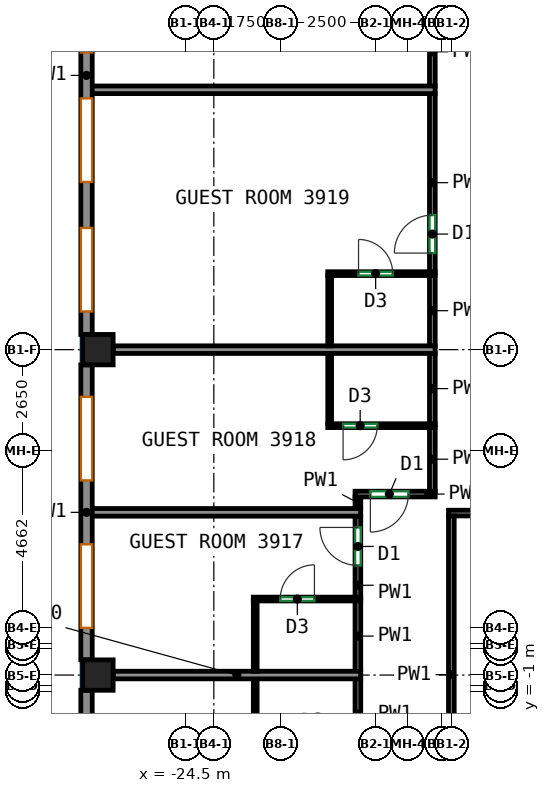
"""IFC4 building model, lengths in metres.
Left out: names, types, materials, properties, quantities, classifications, styles, units other than length and angle.
Written with IfcOpenShell. Run it as: python <this file> out.ifc"""

import sys

from ifc_helpers import new_model, si_unit, direction, frame, frame_2d, origin, origin_2d, place, context, subcontext, project, spatial, rectangle, extrude, source, transform, mapped, element, fill, save


model = new_model("IFC4")
c1 = context("Model", 3, precision=1e-05, world=origin(), true_north=direction((0.0, 1.0)))
c2 = subcontext(c1, "Body", "Model", "MODEL_VIEW")
j1 = project(units=[si_unit("LENGTHUNIT", "METRE"), si_unit("PLANEANGLEUNIT", "RADIAN")], contexts=[c1])
p1 = place(None, origin())
s1 = spatial("IfcSite", under=j1, at=p1, CompositionType="ELEMENT")
p2 = place(p1, origin())
s2 = spatial("IfcBuilding", under=s1, at=p2, CompositionType="ELEMENT")
p3 = place(p2, frame((0.0, 0.0, 168.5)))
s3 = spatial("IfcBuildingStorey", under=s2, at=p3, CompositionType="ELEMENT", Elevation=168.5)
m1 = source(origin(), c2, "Body", "SweptSolid", [
    extrude(rectangle(XDim=0.8, YDim=0.8, at=origin_2d()), origin(), (0.0, 0.0, 1.0), 3.12),
])
for number, where, z_axis, x_axis in (
    (1, (-26.8, -0.562, 0.0), (0.0, 0.0, 1.0), (1.0, 0.0, 0.0)),
    (2, (-26.8, 8.0, 0.0), (0.0, 0.0, 1.0), (1.0, 0.0, 0.0)),
):
    element("IfcColumn", number, at=place(p3, frame(where, z_axis=z_axis, x_axis=x_axis)), inside=s3, PredefinedType="COLUMN", context=c2, shape_type="MappedRepresentation", body=[
        mapped(m1, transform((0.0, 0.0, 0.0))),
    ])
m2 = source(origin(), c2, "Body", "SweptSolid", [
    extrude(rectangle(XDim=13.632, YDim=0.3, at=frame_2d((6.816, 0.0))), origin(), (0.0, 0.0, 1.0), 3.12),
])
p4 = place(p3, frame((-27.1, 22.032, 0.0), z_axis=(0.0, 0.0, 1.0), x_axis=(0.0, -1.0, 0.0)))
e3 = element("IfcWall", 3, at=p4, inside=s3, PredefinedType="SOLIDWALL", context=c2, shape_type="MappedRepresentation", body=[
    mapped(m2, transform((0.0, 0.0, 0.0))),
])
p5 = place(p4, frame((0.604, 0.0, 0.85)))
e4 = element("IfcOpeningElement", 4, at=p5, cuts=e3, PredefinedType="OPENING", context=c2, shape_type="SweptSolid", body=[
    extrude(rectangle(XDim=2.2, YDim=1.95, at=frame_2d((1.1, 0.975))), frame((0.0, 0.16, 0.0), z_axis=(0.0, -1.0, 0.0), x_axis=(1.0, 0.0, 0.0)), (0.0, 0.0, 1.0), 0.32),
])
p6 = place(p4, frame((4.012, 0.0, 0.85)))
e5 = element("IfcOpeningElement", 5, at=p6, cuts=e3, PredefinedType="OPENING", context=c2, shape_type="SweptSolid", body=[
    extrude(rectangle(XDim=2.2, YDim=1.95, at=frame_2d((1.1, 0.975))), frame((0.0, 0.16, 0.0), z_axis=(0.0, -1.0, 0.0), x_axis=(1.0, 0.0, 0.0)), (0.0, 0.0, 1.0), 0.32),
])
p7 = place(p4, frame((7.42, 0.0, 0.85)))
e6 = element("IfcOpeningElement", 6, at=p7, cuts=e3, PredefinedType="OPENING", context=c2, shape_type="SweptSolid", body=[
    extrude(rectangle(XDim=2.2, YDim=1.95, at=frame_2d((1.1, 0.975))), frame((0.0, 0.16, 0.0), z_axis=(0.0, -1.0, 0.0), x_axis=(1.0, 0.0, 0.0)), (0.0, 0.0, 1.0), 0.32),
])
p8 = place(p4, frame((10.828, 0.0, 0.85)))
e7 = element("IfcOpeningElement", 7, at=p8, cuts=e3, PredefinedType="OPENING", context=c2, shape_type="SweptSolid", body=[
    extrude(rectangle(XDim=2.2, YDim=1.95, at=frame_2d((1.1, 0.975))), frame((0.0, 0.16, 0.0), z_axis=(0.0, -1.0, 0.0), x_axis=(1.0, 0.0, 0.0)), (0.0, 0.0, 1.0), 0.32),
])
m3 = source(origin(), c2, "Body", "SweptSolid", [
    extrude(rectangle(XDim=7.763, YDim=0.3, at=frame_2d((3.881, 0.0))), origin(), (0.0, 0.0, 1.0), 3.12),
])
p9 = place(p3, frame((-27.1, 7.6, 0.0), z_axis=(0.0, 0.0, 1.0), x_axis=(0.0, -1.0, 0.0)))
e8 = element("IfcWall", 8, at=p9, inside=s3, PredefinedType="SOLIDWALL", context=c2, shape_type="MappedRepresentation", body=[
    mapped(m3, transform((0.0, 0.0, 0.0))),
])
p10 = place(p9, frame((0.841, 0.0, 0.85)))
e9 = element("IfcOpeningElement", 9, at=p10, cuts=e8, PredefinedType="OPENING", context=c2, shape_type="SweptSolid", body=[
    extrude(rectangle(XDim=2.2, YDim=1.95, at=frame_2d((1.1, 0.975))), frame((0.0, 0.16, 0.0), z_axis=(0.0, -1.0, 0.0), x_axis=(1.0, 0.0, 0.0)), (0.0, 0.0, 1.0), 0.32),
])
p11 = place(p9, frame((4.722, 0.0, 0.85)))
e10 = element("IfcOpeningElement", 10, at=p11, cuts=e8, PredefinedType="OPENING", context=c2, shape_type="SweptSolid", body=[
    extrude(rectangle(XDim=2.2, YDim=1.95, at=frame_2d((1.1, 0.975))), frame((0.0, 0.16, 0.0), z_axis=(0.0, -1.0, 0.0), x_axis=(1.0, 0.0, 0.0)), (0.0, 0.0, 1.0), 0.32),
])
p12 = place(p3, frame((-27.1, -0.962, 0.0), z_axis=(0.0, 0.0, 1.0), x_axis=(0.0, -1.0, 0.0)))
e11 = element("IfcWall", 11, at=p12, inside=s3, PredefinedType="SOLIDWALL", context=c2, shape_type="MappedRepresentation", body=[
    mapped(m3, transform((0.0, 0.0, 0.0))),
])
p13 = place(p12, frame((0.841, 0.0, 0.85)))
e12 = element("IfcOpeningElement", 12, at=p13, cuts=e11, PredefinedType="OPENING", context=c2, shape_type="SweptSolid", body=[
    extrude(rectangle(XDim=2.2, YDim=1.95, at=frame_2d((1.1, 0.975))), frame((0.0, 0.16, 0.0), z_axis=(0.0, -1.0, 0.0), x_axis=(1.0, 0.0, 0.0)), (0.0, 0.0, 1.0), 0.32),
])
p14 = place(p12, frame((4.722, 0.0, 0.85)))
e13 = element("IfcOpeningElement", 13, at=p14, cuts=e11, PredefinedType="OPENING", context=c2, shape_type="SweptSolid", body=[
    extrude(rectangle(XDim=2.2, YDim=1.95, at=frame_2d((1.1, 0.975))), frame((0.0, 0.16, 0.0), z_axis=(0.0, -1.0, 0.0), x_axis=(1.0, 0.0, 0.0)), (0.0, 0.0, 1.0), 0.32),
])
p15 = place(p3, frame((-19.959, -2.522, 0.0), z_axis=(0.0, 0.0, 1.0), x_axis=(0.0, 1.0, 0.0)))
e14 = element("IfcWall", 14, at=p15, inside=s3, PredefinedType="PARTITIONING", context=c2, shape_type="SweptSolid", body=[
    extrude(rectangle(XDim=1.87, YDim=0.15, at=frame_2d((0.935, 0.0))), origin(), (0.0, 0.0, 1.0), 3.12),
])
p16 = place(p3, frame((-19.959, 1.478, 0.0), z_axis=(0.0, 0.0, 1.0), x_axis=(0.0, 1.0, 0.0)))
e15 = element("IfcWall", 15, at=p16, inside=s3, PredefinedType="PARTITIONING", context=c2, shape_type="SweptSolid", body=[
    extrude(rectangle(XDim=2.151, YDim=0.15, at=frame_2d((1.075, 0.0))), origin(), (0.0, 0.0, 1.0), 3.12),
])
p17 = place(p16, frame((0.844, 0.0, 0.0)))
e16 = element("IfcOpeningElement", 16, at=p17, cuts=e15, PredefinedType="OPENING", context=c2, shape_type="SweptSolid", body=[
    extrude(rectangle(XDim=1.0, YDim=2.1, at=frame_2d((0.5, 1.05))), frame((0.0, 0.085, 0.0), z_axis=(0.0, -1.0, 0.0), x_axis=(1.0, 0.0, 0.0)), (0.0, 0.0, 1.0), 0.17),
])
p18 = place(p3, frame((-19.959, -0.472, 0.0), z_axis=(0.0, 0.0, 1.0), x_axis=(0.0, 1.0, 0.0)))
e17 = element("IfcWall", 17, at=p18, inside=s3, PredefinedType="PARTITIONING", context=c2, shape_type="SweptSolid", body=[
    extrude(rectangle(XDim=1.87, YDim=0.15, at=frame_2d((0.935, 0.0))), origin(), (0.0, 0.0, 1.0), 3.12),
])
p19 = place(p3, frame((-19.959, 3.809, 0.0), z_axis=(0.0, 0.0, 1.0), x_axis=(0.0, 1.0, 0.0)))
e18 = element("IfcWall", 18, at=p19, inside=s3, PredefinedType="PARTITIONING", context=c2, shape_type="SweptSolid", body=[
    extrude(rectangle(XDim=0.316, YDim=0.15, at=frame_2d((0.158, 0.0))), origin(), (0.0, 0.0, 1.0), 3.12),
])
p20 = place(p3, frame((-17.925, 4.2, 0.0), z_axis=(0.0, 0.0, 1.0), x_axis=(-1.0, 0.0, 0.0)))
e19 = element("IfcWall", 19, at=p20, inside=s3, PredefinedType="PARTITIONING", context=c2, shape_type="SweptSolid", body=[
    extrude(rectangle(XDim=2.109, YDim=0.15, at=frame_2d((1.054, 0.0))), origin(), (0.0, 0.0, 1.0), 3.12),
])
p21 = place(p20, frame((0.706, 0.0, 0.0)))
e20 = element("IfcOpeningElement", 20, at=p21, cuts=e19, PredefinedType="OPENING", context=c2, shape_type="SweptSolid", body=[
    extrude(rectangle(XDim=1.0, YDim=2.1, at=frame_2d((0.5, 1.05))), frame((0.0, 0.085, 0.0), z_axis=(0.0, -1.0, 0.0), x_axis=(1.0, 0.0, 0.0)), (0.0, 0.0, 1.0), 0.17),
])
p22 = place(p3, frame((-18.0, 4.275, 0.0), z_axis=(0.0, 0.0, 1.0), x_axis=(0.0, 1.0, 0.0)))
e21 = element("IfcWall", 21, at=p22, inside=s3, PredefinedType="PARTITIONING", context=c2, shape_type="SweptSolid", body=[
    extrude(rectangle(XDim=1.685, YDim=0.15, at=frame_2d((0.843, 0.0))), origin(), (0.0, 0.0, 1.0), 3.12),
])
p23 = place(p3, frame((-18.0, 6.04, 0.0), z_axis=(0.0, 0.0, 1.0), x_axis=(0.0, 1.0, 0.0)))
e22 = element("IfcWall", 22, at=p23, inside=s3, PredefinedType="PARTITIONING", context=c2, shape_type="SweptSolid", body=[
    extrude(rectangle(XDim=1.87, YDim=0.15, at=frame_2d((0.935, 0.0))), origin(), (0.0, 0.0, 1.0), 3.12),
])
p24 = place(p3, frame((-18.0, 10.04, 0.0), z_axis=(0.0, 0.0, 1.0), x_axis=(0.0, 1.0, 0.0)))
e23 = element("IfcWall", 23, at=p24, inside=s3, PredefinedType="PARTITIONING", context=c2, shape_type="SweptSolid", body=[
    extrude(rectangle(XDim=4.707, YDim=0.15, at=frame_2d((2.354, 0.0))), origin(), (0.0, 0.0, 1.0), 3.12),
])
p25 = place(p24, frame((0.501, 0.0, 0.0)))
e24 = element("IfcOpeningElement", 24, at=p25, cuts=e23, PredefinedType="OPENING", context=c2, shape_type="SweptSolid", body=[
    extrude(rectangle(XDim=1.0, YDim=2.1, at=frame_2d((0.5, 1.05))), frame((0.0, 0.085, 0.0), z_axis=(0.0, -1.0, 0.0), x_axis=(1.0, 0.0, 0.0)), (0.0, 0.0, 1.0), 0.17),
])
p26 = place(p3, frame((-18.0, 8.09, 0.0), z_axis=(0.0, 0.0, 1.0), x_axis=(0.0, 1.0, 0.0)))
e25 = element("IfcWall", 25, at=p26, inside=s3, PredefinedType="PARTITIONING", context=c2, shape_type="SweptSolid", body=[
    extrude(rectangle(XDim=1.87, YDim=0.15, at=frame_2d((0.935, 0.0))), origin(), (0.0, 0.0, 1.0), 3.12),
])
p27 = place(p3, frame((-18.0, 14.927, 0.0), z_axis=(0.0, 0.0, 1.0), x_axis=(0.0, 1.0, 0.0)))
e26 = element("IfcWall", 26, at=p27, inside=s3, PredefinedType="PARTITIONING", context=c2, shape_type="SweptSolid", body=[
    extrude(rectangle(XDim=3.033, YDim=0.15, at=frame_2d((1.517, 0.0))), origin(), (0.0, 0.0, 1.0), 3.12),
])
p28 = place(p27, frame((1.425, 0.0, 0.0)))
e27 = element("IfcOpeningElement", 27, at=p28, cuts=e26, PredefinedType="OPENING", context=c2, shape_type="SweptSolid", body=[
    extrude(rectangle(XDim=1.0, YDim=2.1, at=frame_2d((0.5, 1.05))), frame((0.0, 0.085, 0.0), z_axis=(0.0, -1.0, 0.0), x_axis=(1.0, 0.0, 0.0)), (0.0, 0.0, 1.0), 0.17),
])
p29 = place(p3, frame((-17.575, 3.7, 0.0), z_axis=(0.0, 0.0, 1.0), x_axis=(1.0, 0.0, 0.0)))
e28 = element("IfcWall", 28, at=p29, inside=s3, PredefinedType="PARTITIONING", context=c2, shape_type="SweptSolid", body=[
    extrude(rectangle(XDim=33.85, YDim=0.15, at=frame_2d((16.925, 0.0))), origin(), (0.0, 0.0, 1.0), 3.12),
])
p30 = place(p29, frame((6.596, 0.0, 0.0)))
e29 = element("IfcOpeningElement", 29, at=p30, cuts=e28, PredefinedType="OPENING", context=c2, shape_type="SweptSolid", body=[
    extrude(rectangle(XDim=0.9, YDim=2.1, at=frame_2d((0.45, 1.05))), frame((0.0, 0.085, 0.0), z_axis=(0.0, -1.0, 0.0), x_axis=(1.0, 0.0, 0.0)), (0.0, 0.0, 1.0), 0.17),
])
p31 = place(p29, frame((10.082, 0.0, 0.0)))
e30 = element("IfcOpeningElement", 30, at=p31, cuts=e28, PredefinedType="OPENING", context=c2, shape_type="SweptSolid", body=[
    extrude(rectangle(XDim=0.9, YDim=2.1, at=frame_2d((0.45, 1.05))), frame((0.0, 0.085, 0.0), z_axis=(0.0, -1.0, 0.0), x_axis=(1.0, 0.0, 0.0)), (0.0, 0.0, 1.0), 0.17),
])
p32 = place(p29, frame((21.767, 0.0, 0.0)))
e31 = element("IfcOpeningElement", 31, at=p32, cuts=e28, PredefinedType="OPENING", context=c2, shape_type="SweptSolid", body=[
    extrude(rectangle(XDim=0.9, YDim=2.1, at=frame_2d((0.45, 1.05))), frame((0.0, 0.085, 0.0), z_axis=(0.0, -1.0, 0.0), x_axis=(1.0, 0.0, 0.0)), (0.0, 0.0, 1.0), 0.17),
])
p33 = place(p29, frame((29.649, 0.0, 0.0)))
e32 = element("IfcOpeningElement", 32, at=p33, cuts=e28, PredefinedType="OPENING", context=c2, shape_type="SweptSolid", body=[
    extrude(rectangle(XDim=0.9, YDim=2.1, at=frame_2d((0.45, 1.05))), frame((0.0, 0.085, 0.0), z_axis=(0.0, -1.0, 0.0), x_axis=(1.0, 0.0, 0.0)), (0.0, 0.0, 1.0), 0.17),
])
p34 = place(p3, frame((-17.5, -4.725, 0.0), z_axis=(0.0, 0.0, 1.0), x_axis=(0.0, 1.0, 0.0)))
e33 = element("IfcWall", 33, at=p34, inside=s3, PredefinedType="PARTITIONING", context=c2, shape_type="SweptSolid", body=[
    extrude(rectangle(XDim=8.35, YDim=0.15, at=frame_2d((4.175, 0.0))), origin(), (0.0, 0.0, 1.0), 3.12),
])
p35 = place(p34, frame((0.704, 0.0, 0.0)))
e34 = element("IfcOpeningElement", 34, at=p35, cuts=e33, PredefinedType="OPENING", context=c2, shape_type="SweptSolid", body=[
    extrude(rectangle(XDim=1.0, YDim=2.1, at=frame_2d((0.5, 1.05))), frame((0.0, 0.085, 0.0), z_axis=(0.0, -1.0, 0.0), x_axis=(1.0, 0.0, 0.0)), (0.0, 0.0, 1.0), 0.17),
])
p36 = place(p3, frame((-22.661, -2.512, 0.0), z_axis=(0.0, 0.0, 1.0), x_axis=(0.0, 1.0, 0.0)))
e35 = element("IfcWall", 35, at=p36, inside=s3, PredefinedType="PARTITIONING", context=c2, shape_type="SweptSolid", body=[
    extrude(rectangle(XDim=1.85, YDim=0.1, at=frame_2d((0.925, 0.0))), origin(), (0.0, 0.0, 1.0), 3.12),
])
p37 = place(p3, frame((-26.4, -0.562, 0.0), z_axis=(0.0, 0.0, 1.0), x_axis=(1.0, 0.0, 0.0)))
e36 = element("IfcWall", 36, at=p37, inside=s3, PredefinedType="PARTITIONING", context=c2, shape_type="SweptSolid", body=[
    extrude(rectangle(XDim=6.514, YDim=0.2, at=frame_2d((3.257, 0.0))), origin(), (0.0, 0.0, 1.0), 2.52),
])
p38 = place(p3, frame((-22.711, 1.438, 0.0), z_axis=(0.0, 0.0, 1.0), x_axis=(1.0, 0.0, 0.0)))
e37 = element("IfcWall", 37, at=p38, inside=s3, PredefinedType="PARTITIONING", context=c2, shape_type="SweptSolid", body=[
    extrude(rectangle(XDim=2.825, YDim=0.1, at=frame_2d((1.413, 0.0))), origin(), (0.0, 0.0, 1.0), 3.12),
])
p39 = place(p38, frame((0.708, 0.0, 0.0)))
e38 = element("IfcOpeningElement", 38, at=p39, cuts=e37, PredefinedType="OPENING", context=c2, shape_type="SweptSolid", body=[
    extrude(rectangle(XDim=0.9, YDim=2.1, at=frame_2d((0.45, 1.05))), frame((0.0, 0.06, 0.0), z_axis=(0.0, -1.0, 0.0), x_axis=(1.0, 0.0, 0.0)), (0.0, 0.0, 1.0), 0.12),
])
p40 = place(p3, frame((-22.661, -0.462, 0.0), z_axis=(0.0, 0.0, 1.0), x_axis=(0.0, 1.0, 0.0)))
e39 = element("IfcWall", 39, at=p40, inside=s3, PredefinedType="PARTITIONING", context=c2, shape_type="SweptSolid", body=[
    extrude(rectangle(XDim=1.85, YDim=0.1, at=frame_2d((0.925, 0.0))), origin(), (0.0, 0.0, 1.0), 3.12),
])
p41 = place(p3, frame((-27.0, 3.719, 0.0), z_axis=(0.0, 0.0, 1.0), x_axis=(1.0, 0.0, 0.0)))
e40 = element("IfcWall", 40, at=p41, inside=s3, PredefinedType="PARTITIONING", context=c2, shape_type="SweptSolid", body=[
    extrude(rectangle(XDim=7.114, YDim=0.2, at=frame_2d((3.557, 0.0))), origin(), (0.0, 0.0, 1.0), 3.12),
])
p42 = place(p3, frame((-17.927, 6.0, 0.0), z_axis=(0.0, 0.0, 1.0), x_axis=(-1.0, 0.0, 0.0)))
e41 = element("IfcWall", 41, at=p42, inside=s3, PredefinedType="PARTITIONING", context=c2, shape_type="SweptSolid", body=[
    extrude(rectangle(XDim=2.825, YDim=0.1, at=frame_2d((1.413, 0.0))), origin(), (0.0, 0.0, 1.0), 3.12),
])
p43 = place(p42, frame((1.522, 0.0, 0.0)))
e42 = element("IfcOpeningElement", 42, at=p43, cuts=e41, PredefinedType="OPENING", context=c2, shape_type="SweptSolid", body=[
    extrude(rectangle(XDim=0.9, YDim=2.1, at=frame_2d((0.45, 1.05))), frame((0.0, 0.06, 0.0), z_axis=(0.0, -1.0, 0.0), x_axis=(1.0, 0.0, 0.0)), (0.0, 0.0, 1.0), 0.12),
])
p44 = place(p3, frame((-20.702, 6.05, 0.0), z_axis=(0.0, 0.0, 1.0), x_axis=(0.0, 1.0, 0.0)))
e43 = element("IfcWall", 43, at=p44, inside=s3, PredefinedType="PARTITIONING", context=c2, shape_type="SweptSolid", body=[
    extrude(rectangle(XDim=1.85, YDim=0.1, at=frame_2d((0.925, 0.0))), origin(), (0.0, 0.0, 1.0), 3.12),
])
p45 = place(p3, frame((-26.4, 8.0, 0.0), z_axis=(0.0, 0.0, 1.0), x_axis=(1.0, 0.0, 0.0)))
e44 = element("IfcWall", 44, at=p45, inside=s3, PredefinedType="PARTITIONING", context=c2, shape_type="SweptSolid", body=[
    extrude(rectangle(XDim=8.473, YDim=0.2, at=frame_2d((4.236, 0.0))), origin(), (0.0, 0.0, 1.0), 3.12),
])
p46 = place(p3, frame((-20.752, 10.0, 0.0), z_axis=(0.0, 0.0, 1.0), x_axis=(1.0, 0.0, 0.0)))
e45 = element("IfcWall", 45, at=p46, inside=s3, PredefinedType="PARTITIONING", context=c2, shape_type="SweptSolid", body=[
    extrude(rectangle(XDim=2.825, YDim=0.1, at=frame_2d((1.413, 0.0))), origin(), (0.0, 0.0, 1.0), 3.12),
])
p47 = place(p46, frame((0.81, 0.0, 0.0)))
e46 = element("IfcOpeningElement", 46, at=p47, cuts=e45, PredefinedType="OPENING", context=c2, shape_type="SweptSolid", body=[
    extrude(rectangle(XDim=0.9, YDim=2.1, at=frame_2d((0.45, 1.05))), frame((0.0, 0.06, 0.0), z_axis=(0.0, -1.0, 0.0), x_axis=(1.0, 0.0, 0.0)), (0.0, 0.0, 1.0), 0.12),
])
p48 = place(p3, frame((-20.702, 8.1, 0.0), z_axis=(0.0, 0.0, 1.0), x_axis=(0.0, 1.0, 0.0)))
e47 = element("IfcWall", 47, at=p48, inside=s3, PredefinedType="PARTITIONING", context=c2, shape_type="SweptSolid", body=[
    extrude(rectangle(XDim=1.85, YDim=0.1, at=frame_2d((0.925, 0.0))), origin(), (0.0, 0.0, 1.0), 3.12),
])
p49 = place(p3, frame((-17.927, 14.837, 0.0), z_axis=(0.0, 0.0, 1.0), x_axis=(-1.0, 0.0, 0.0)))
e48 = element("IfcWall", 48, at=p49, inside=s3, PredefinedType="PARTITIONING", context=c2, shape_type="SweptSolid", body=[
    extrude(rectangle(XDim=9.073, YDim=0.2, at=frame_2d((4.537, 0.0))), origin(), (0.0, 0.0, 1.0), 3.12),
])
p50 = place(p6, origin())
e49 = element("IfcWindow", 49, at=p50, inside=s3, PartitioningType="SINGLE_PANEL", PredefinedType="WINDOW", context=c2, shape_type="SweptSolid", body=[
    extrude(rectangle(XDim=2.2, YDim=1.95, at=frame_2d((1.1, 0.975))), frame((0.0, 0.03, 0.0), z_axis=(0.0, -1.0, 0.0), x_axis=(1.0, 0.0, 0.0)), (0.0, 0.0, 1.0), 0.06),
])
fill(e5, e49)
p51 = place(p7, origin())
e50 = element("IfcWindow", 50, at=p51, inside=s3, PartitioningType="SINGLE_PANEL", PredefinedType="WINDOW", context=c2, shape_type="SweptSolid", body=[
    extrude(rectangle(XDim=2.2, YDim=1.95, at=frame_2d((1.1, 0.975))), frame((0.0, 0.03, 0.0), z_axis=(0.0, -1.0, 0.0), x_axis=(1.0, 0.0, 0.0)), (0.0, 0.0, 1.0), 0.06),
])
fill(e6, e50)
p52 = place(p8, origin())
e51 = element("IfcWindow", 51, at=p52, inside=s3, PartitioningType="SINGLE_PANEL", PredefinedType="WINDOW", context=c2, shape_type="SweptSolid", body=[
    extrude(rectangle(XDim=2.2, YDim=1.95, at=frame_2d((1.1, 0.975))), frame((0.0, 0.03, 0.0), z_axis=(0.0, -1.0, 0.0), x_axis=(1.0, 0.0, 0.0)), (0.0, 0.0, 1.0), 0.06),
])
fill(e7, e51)
p53 = place(p10, origin())
e52 = element("IfcWindow", 52, at=p53, inside=s3, PartitioningType="SINGLE_PANEL", PredefinedType="WINDOW", context=c2, shape_type="SweptSolid", body=[
    extrude(rectangle(XDim=2.2, YDim=1.95, at=frame_2d((1.1, 0.975))), frame((0.0, 0.03, 0.0), z_axis=(0.0, -1.0, 0.0), x_axis=(1.0, 0.0, 0.0)), (0.0, 0.0, 1.0), 0.06),
])
fill(e9, e52)
p54 = place(p11, origin())
e53 = element("IfcWindow", 53, at=p54, inside=s3, PartitioningType="SINGLE_PANEL", PredefinedType="WINDOW", context=c2, shape_type="SweptSolid", body=[
    extrude(rectangle(XDim=2.2, YDim=1.95, at=frame_2d((1.1, 0.975))), frame((0.0, 0.03, 0.0), z_axis=(0.0, -1.0, 0.0), x_axis=(1.0, 0.0, 0.0)), (0.0, 0.0, 1.0), 0.06),
])
fill(e10, e53)
p55 = place(p39, origin())
e54 = element("IfcDoor", 54, at=p55, inside=s3, OperationType="SINGLE_SWING_RIGHT", PredefinedType="DOOR", context=c2, shape_type="SweptSolid", body=[
    extrude(rectangle(XDim=0.9, YDim=2.1, at=frame_2d((0.45, 1.05))), frame((0.0, 0.025, 0.0), z_axis=(0.0, -1.0, 0.0), x_axis=(1.0, 0.0, 0.0)), (0.0, 0.0, 1.0), 0.05),
])
fill(e38, e54)
p56 = place(p17, origin())
e55 = element("IfcDoor", 55, at=p56, inside=s3, OperationType="SINGLE_SWING_RIGHT", PredefinedType="DOOR", context=c2, shape_type="SweptSolid", body=[
    extrude(rectangle(XDim=1.0, YDim=2.1, at=frame_2d((0.5, 1.05))), frame((0.0, 0.025, 0.0), z_axis=(0.0, -1.0, 0.0), x_axis=(1.0, 0.0, 0.0)), (0.0, 0.0, 1.0), 0.05),
])
fill(e16, e55)
p57 = place(p21, origin())
e56 = element("IfcDoor", 56, at=p57, inside=s3, OperationType="SINGLE_SWING_RIGHT", PredefinedType="DOOR", context=c2, shape_type="SweptSolid", body=[
    extrude(rectangle(XDim=1.0, YDim=2.1, at=frame_2d((0.5, 1.05))), frame((0.0, 0.025, 0.0), z_axis=(0.0, -1.0, 0.0), x_axis=(1.0, 0.0, 0.0)), (0.0, 0.0, 1.0), 0.05),
])
fill(e20, e56)
p58 = place(p43, origin())
e57 = element("IfcDoor", 57, at=p58, inside=s3, OperationType="SINGLE_SWING_RIGHT", PredefinedType="DOOR", context=c2, shape_type="SweptSolid", body=[
    extrude(rectangle(XDim=0.9, YDim=2.1, at=frame_2d((0.45, 1.05))), frame((0.0, 0.025, 0.0), z_axis=(0.0, -1.0, 0.0), x_axis=(1.0, 0.0, 0.0)), (0.0, 0.0, 1.0), 0.05),
])
fill(e42, e57)
p59 = place(p47, origin())
e58 = element("IfcDoor", 58, at=p59, inside=s3, OperationType="SINGLE_SWING_LEFT", PredefinedType="DOOR", context=c2, shape_type="SweptSolid", body=[
    extrude(rectangle(XDim=0.9, YDim=2.1, at=frame_2d((0.45, 1.05))), frame((0.0, 0.025, 0.0), z_axis=(0.0, -1.0, 0.0), x_axis=(1.0, 0.0, 0.0)), (0.0, 0.0, 1.0), 0.05),
])
fill(e46, e58)
p60 = place(p25, origin())
e59 = element("IfcDoor", 59, at=p60, inside=s3, OperationType="SINGLE_SWING_LEFT", PredefinedType="DOOR", context=c2, shape_type="SweptSolid", body=[
    extrude(rectangle(XDim=1.0, YDim=2.1, at=frame_2d((0.5, 1.05))), frame((0.0, 0.025, 0.0), z_axis=(0.0, -1.0, 0.0), x_axis=(1.0, 0.0, 0.0)), (0.0, 0.0, 1.0), 0.05),
])
fill(e24, e59)
save(model, sys.argv[1])
